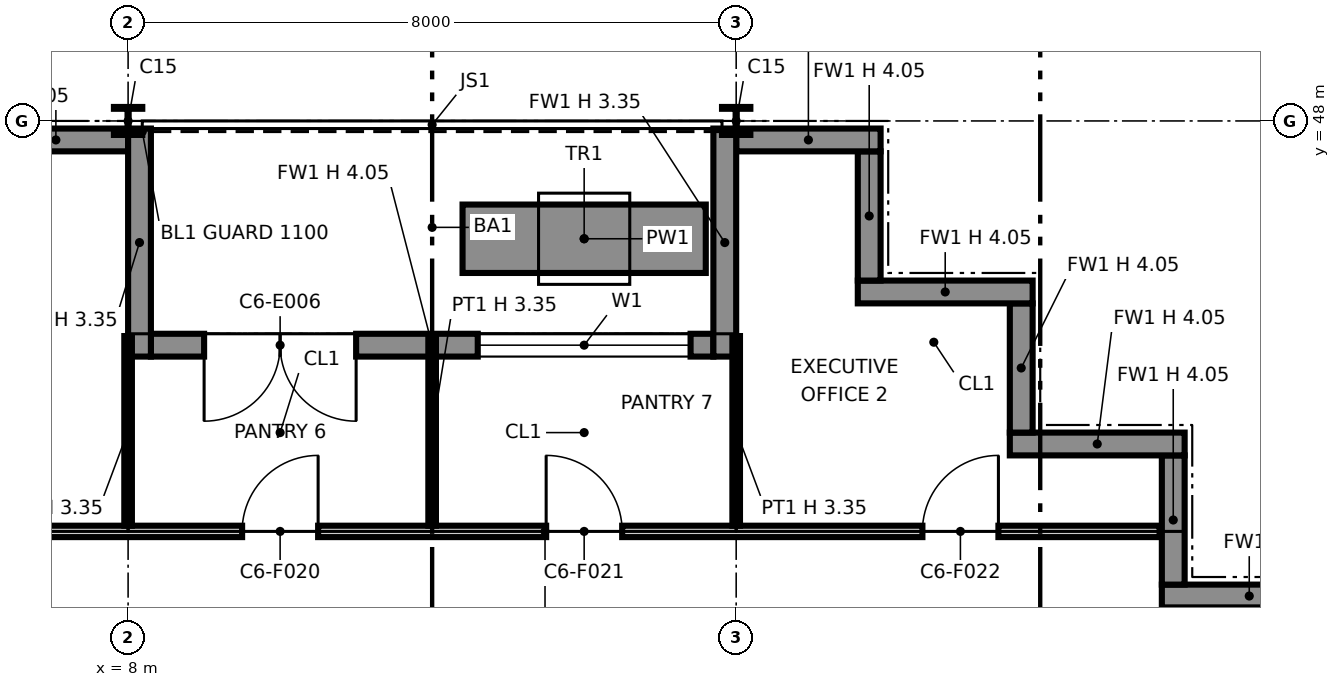
"""IFC4 building model, lengths in metres.
Left out: names, types, materials, properties, quantities, classifications, styles, units other than length and angle.
Written with IfcOpenShell. Run it as: python <this file> out.ifc"""

import sys

from ifc_helpers import new_model, si_unit, direction, frame, frame_2d, origin, origin_2d, place, context, subcontext, project, spatial, rectangle, i_section, extrude, element, fill, save


model = new_model("IFC4")
c1 = context("Model", 3, precision=1e-05, world=origin(), true_north=direction((0.0, 1.0)))
c2 = subcontext(c1, "Body", "Model", "MODEL_VIEW")
j1 = project(units=[si_unit("LENGTHUNIT", "METRE"), si_unit("PLANEANGLEUNIT", "RADIAN")], contexts=[c1])
p1 = place(None, origin())
s1 = spatial("IfcSite", under=j1, at=p1, CompositionType="ELEMENT")
p2 = place(p1, origin())
s2 = spatial("IfcBuilding", under=s1, at=p2, CompositionType="ELEMENT")
p3 = place(p2, frame((0.0, 0.0, 174.6)))
s3 = spatial("IfcBuildingStorey", under=s2, at=p3, CompositionType="ELEMENT", Elevation=174.6)
for number, where, z_axis, x_axis in (
    (1, (8.0, 48.0, 0.0), (0.0, 0.0, 1.0), (1.0, 0.0, 0.0)),
    (2, (16.0, 48.0, 0.0), (0.0, 0.0, 1.0), (1.0, 0.0, 0.0)),
):
    element("IfcColumn", number, at=place(p3, frame(where, z_axis=z_axis, x_axis=x_axis)), inside=s3, PredefinedType="COLUMN", context=c2, shape_type="SweptSolid", body=[
        extrude(i_section(OverallWidth=0.373, OverallDepth=0.368, WebThickness=0.015, FlangeThickness=0.024, at=origin_2d()), origin(), (0.0, 0.0, 1.0), 4.05),
    ])
p4 = place(p3, frame((23.9, 41.75, 0.0), z_axis=(0.0, 0.0, 1.0), x_axis=(-1.0, 0.0, 0.0)))
e3 = element("IfcWall", 3, at=p4, inside=s3, PredefinedType="SOLIDWALL", context=c2, shape_type="SweptSolid", body=[
    extrude(rectangle(XDim=2.3, YDim=0.3, at=frame_2d((1.15, 0.0))), origin(), (0.0, 0.0, 1.0), 4.05),
])
p5 = place(p3, frame((21.75, 41.9, 0.0), z_axis=(0.0, 0.0, 1.0), x_axis=(0.0, 1.0, 0.0)))
e4 = element("IfcWall", 4, at=p5, inside=s3, PredefinedType="SOLIDWALL", context=c2, shape_type="SweptSolid", body=[
    extrude(rectangle(XDim=1.7, YDim=0.3, at=frame_2d((0.85, 0.0))), origin(), (0.0, 0.0, 1.0), 4.05),
])
p6 = place(p3, frame((21.9, 43.75, 0.0), z_axis=(0.0, 0.0, 1.0), x_axis=(-1.0, 0.0, 0.0)))
e5 = element("IfcWall", 5, at=p6, inside=s3, PredefinedType="SOLIDWALL", context=c2, shape_type="SweptSolid", body=[
    extrude(rectangle(XDim=2.3, YDim=0.3, at=frame_2d((1.15, 0.0))), origin(), (0.0, 0.0, 1.0), 4.05),
])
p7 = place(p3, frame((19.75, 43.9, 0.0), z_axis=(0.0, 0.0, 1.0), x_axis=(0.0, 1.0, 0.0)))
e6 = element("IfcWall", 6, at=p7, inside=s3, PredefinedType="SOLIDWALL", context=c2, shape_type="SweptSolid", body=[
    extrude(rectangle(XDim=1.7, YDim=0.3, at=frame_2d((0.85, 0.0))), origin(), (0.0, 0.0, 1.0), 4.05),
])
p8 = place(p3, frame((19.9, 45.75, 0.0), z_axis=(0.0, 0.0, 1.0), x_axis=(-1.0, 0.0, 0.0)))
e7 = element("IfcWall", 7, at=p8, inside=s3, PredefinedType="SOLIDWALL", context=c2, shape_type="SweptSolid", body=[
    extrude(rectangle(XDim=2.3, YDim=0.3, at=frame_2d((1.15, 0.0))), origin(), (0.0, 0.0, 1.0), 4.05),
])
p9 = place(p3, frame((17.75, 45.9, 0.0), z_axis=(0.0, 0.0, 1.0), x_axis=(0.0, 1.0, 0.0)))
e8 = element("IfcWall", 8, at=p9, inside=s3, PredefinedType="SOLIDWALL", context=c2, shape_type="SweptSolid", body=[
    extrude(rectangle(XDim=1.7, YDim=0.3, at=frame_2d((0.85, 0.0))), origin(), (0.0, 0.0, 1.0), 4.05),
])
p10 = place(p3, frame((17.9, 47.75, 0.0), z_axis=(0.0, 0.0, 1.0), x_axis=(-1.0, 0.0, 0.0)))
e9 = element("IfcWall", 9, at=p10, inside=s3, PredefinedType="SOLIDWALL", context=c2, shape_type="SweptSolid", body=[
    extrude(rectangle(XDim=1.9, YDim=0.3, at=frame_2d((0.95, 0.0))), origin(), (0.0, 0.0, 1.0), 4.05),
])
p11 = place(p3, frame((15.7, 45.05, 0.0), z_axis=(0.0, 0.0, 1.0), x_axis=(-1.0, 0.0, 0.0)))
e10 = element("IfcWall", 10, at=p11, inside=s3, PredefinedType="SOLIDWALL", context=c2, shape_type="SweptSolid", body=[
    extrude(rectangle(XDim=7.4, YDim=0.3, at=frame_2d((3.7, 0.0))), origin(), (0.0, 0.0, 1.0), 4.05),
])
p12 = place(p11, frame((0.3, 0.0, 0.9)))
e11 = element("IfcOpeningElement", 11, at=p12, cuts=e10, PredefinedType="OPENING", context=c2, shape_type="SweptSolid", body=[
    extrude(rectangle(XDim=2.8, YDim=2.2, at=frame_2d((1.4, 1.1))), frame((0.0, 0.16, 0.0), z_axis=(0.0, -1.0, 0.0), x_axis=(1.0, 0.0, 0.0)), (0.0, 0.0, 1.0), 0.32),
])
p13 = place(p11, frame((4.7, 0.0, 0.0)))
e12 = element("IfcOpeningElement", 12, at=p13, cuts=e10, PredefinedType="OPENING", context=c2, shape_type="SweptSolid", body=[
    extrude(rectangle(XDim=2.0, YDim=2.4, at=frame_2d((1.0, 1.2))), frame((0.0, 0.16, 0.0), z_axis=(0.0, -1.0, 0.0), x_axis=(1.0, 0.0, 0.0)), (0.0, 0.0, 1.0), 0.32),
])
for number, where, z_axis, x_axis in (
    (13, (15.85, 47.9, 0.0), (0.0, 0.0, 1.0), (0.0, -1.0, 0.0)),
    (14, (8.15, 47.9, 0.0), (0.0, 0.0, 1.0), (0.0, -1.0, 0.0)),
):
    element("IfcWall", number, at=place(p3, frame(where, z_axis=z_axis, x_axis=x_axis)), inside=s3, PredefinedType="SOLIDWALL", context=c2, shape_type="SweptSolid", body=[
        extrude(rectangle(XDim=3.0, YDim=0.3, at=frame_2d((1.5, 0.0))), origin(), (0.0, 0.0, 1.0), 3.353),
    ])
p14 = place(p3, frame((8.0, 47.75, 0.0), z_axis=(0.0, 0.0, 1.0), x_axis=(-1.0, 0.0, 0.0)))
e15 = element("IfcWall", 15, at=p14, inside=s3, PredefinedType="SOLIDWALL", context=c2, shape_type="SweptSolid", body=[
    extrude(rectangle(XDim=1.9, YDim=0.3, at=frame_2d((0.95, 0.0))), origin(), (0.0, 0.0, 1.0), 4.05),
])
p15 = place(p3, frame((15.6, 46.45, 0.0), z_axis=(0.0, 0.0, 1.0), x_axis=(-1.0, 0.0, 0.0)))
e16 = element("IfcWall", 16, at=p15, inside=s3, PredefinedType="SOLIDWALL", context=c2, shape_type="SweptSolid", body=[
    extrude(rectangle(XDim=3.2, YDim=0.9, at=frame_2d((1.6, 0.0))), origin(), (0.0, 0.0, 1.0), 0.6),
])
p16 = place(p3, frame((5.4, 42.6, 0.0), z_axis=(0.0, 0.0, 1.0), x_axis=(1.0, 0.0, 0.0)))
e17 = element("IfcWall", 17, at=p16, inside=s3, PredefinedType="PARTITIONING", context=c2, shape_type="SweptSolid", body=[
    extrude(rectangle(XDim=16.17, YDim=0.15, at=frame_2d((8.085, 0.0))), origin(), (0.0, 0.0, 1.0), 4.05),
])
p17 = place(p16, frame((4.1, 0.0, 0.0)))
e18 = element("IfcOpeningElement", 18, at=p17, cuts=e17, PredefinedType="OPENING", context=c2, shape_type="SweptSolid", body=[
    extrude(rectangle(XDim=1.0, YDim=2.1, at=frame_2d((0.5, 1.05))), frame((0.0, 0.085, 0.0), z_axis=(0.0, -1.0, 0.0), x_axis=(1.0, 0.0, 0.0)), (0.0, 0.0, 1.0), 0.17),
])
p18 = place(p16, frame((8.1, 0.0, 0.0)))
e19 = element("IfcOpeningElement", 19, at=p18, cuts=e17, PredefinedType="OPENING", context=c2, shape_type="SweptSolid", body=[
    extrude(rectangle(XDim=1.0, YDim=2.1, at=frame_2d((0.5, 1.05))), frame((0.0, 0.085, 0.0), z_axis=(0.0, -1.0, 0.0), x_axis=(1.0, 0.0, 0.0)), (0.0, 0.0, 1.0), 0.17),
])
p19 = place(p16, frame((13.05, 0.0, 0.0)))
e20 = element("IfcOpeningElement", 20, at=p19, cuts=e17, PredefinedType="OPENING", context=c2, shape_type="SweptSolid", body=[
    extrude(rectangle(XDim=1.0, YDim=2.1, at=frame_2d((0.5, 1.05))), frame((0.0, 0.085, 0.0), z_axis=(0.0, -1.0, 0.0), x_axis=(1.0, 0.0, 0.0)), (0.0, 0.0, 1.0), 0.17),
])
for number, where, z_axis, x_axis in (
    (21, (8.0, 42.675, 0.0), (0.0, 0.0, 1.0), (0.0, 1.0, 0.0)),
    (22, (12.0, 42.675, 0.0), (0.0, 0.0, 1.0), (0.0, 1.0, 0.0)),
    (23, (16.0, 42.675, 0.0), (0.0, 0.0, 1.0), (0.0, 1.0, 0.0)),
):
    element("IfcWall", number, at=place(p3, frame(where, z_axis=z_axis, x_axis=x_axis)), inside=s3, PredefinedType="PARTITIONING", context=c2, shape_type="SweptSolid", body=[
        extrude(rectangle(XDim=2.495, YDim=0.1, at=frame_2d((1.248, 0.0))), origin(), (0.0, 0.0, 1.0), 3.354),
    ])
p20 = place(p12, origin())
e24 = element("IfcWindow", 24, at=p20, inside=s3, PartitioningType="SINGLE_PANEL", PredefinedType="WINDOW", context=c2, shape_type="SweptSolid", body=[
    extrude(rectangle(XDim=2.8, YDim=2.2, at=frame_2d((1.4, 1.1))), frame((0.0, 0.03, 0.0), z_axis=(0.0, -1.0, 0.0), x_axis=(1.0, 0.0, 0.0)), (0.0, 0.0, 1.0), 0.06),
])
fill(e11, e24)
p21 = place(p13, origin())
e25 = element("IfcDoor", 25, at=p21, inside=s3, OperationType="DOUBLE_DOOR_SINGLE_SWING", PredefinedType="DOOR", context=c2, shape_type="SweptSolid", body=[
    extrude(rectangle(XDim=2.0, YDim=2.4, at=frame_2d((1.0, 1.2))), frame((0.0, 0.025, 0.0), z_axis=(0.0, -1.0, 0.0), x_axis=(1.0, 0.0, 0.0)), (0.0, 0.0, 1.0), 0.05),
])
fill(e12, e25)
p22 = place(p17, origin())
e26 = element("IfcDoor", 26, at=p22, inside=s3, OperationType="SINGLE_SWING_RIGHT", PredefinedType="DOOR", context=c2, shape_type="SweptSolid", body=[
    extrude(rectangle(XDim=1.0, YDim=2.1, at=frame_2d((0.5, 1.05))), frame((0.0, 0.025, 0.0), z_axis=(0.0, -1.0, 0.0), x_axis=(1.0, 0.0, 0.0)), (0.0, 0.0, 1.0), 0.05),
])
fill(e18, e26)
p23 = place(p18, origin())
e27 = element("IfcDoor", 27, at=p23, inside=s3, OperationType="SINGLE_SWING_LEFT", PredefinedType="DOOR", context=c2, shape_type="SweptSolid", body=[
    extrude(rectangle(XDim=1.0, YDim=2.1, at=frame_2d((0.5, 1.05))), frame((0.0, 0.025, 0.0), z_axis=(0.0, -1.0, 0.0), x_axis=(1.0, 0.0, 0.0)), (0.0, 0.0, 1.0), 0.05),
])
fill(e19, e27)
p24 = place(p19, origin())
e28 = element("IfcDoor", 28, at=p24, inside=s3, OperationType="SINGLE_SWING_RIGHT", PredefinedType="DOOR", context=c2, shape_type="SweptSolid", body=[
    extrude(rectangle(XDim=1.0, YDim=2.1, at=frame_2d((0.5, 1.05))), frame((0.0, 0.025, 0.0), z_axis=(0.0, -1.0, 0.0), x_axis=(1.0, 0.0, 0.0)), (0.0, 0.0, 1.0), 0.05),
])
fill(e20, e28)
save(model, sys.argv[1])
